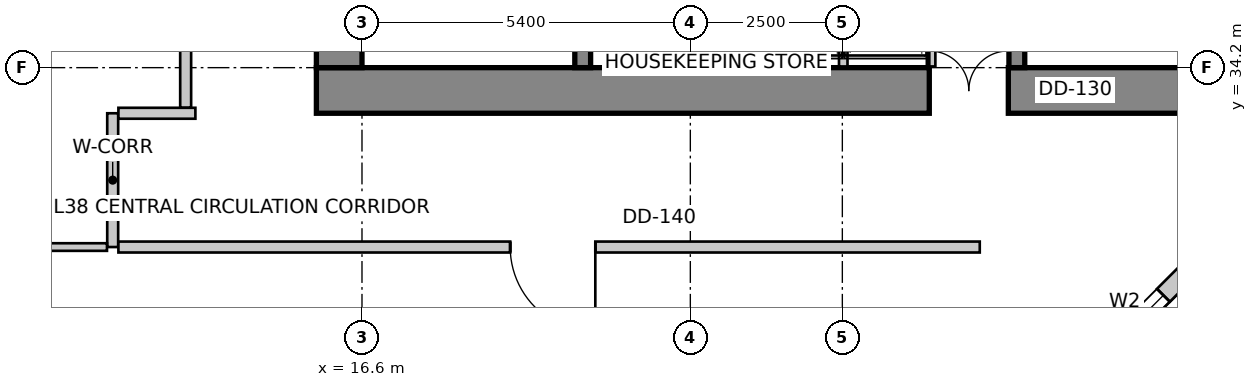
"""IFC4 building model, lengths in metres.
Left out: names, types, materials, properties, quantities, classifications, styles, units other than length and angle.
Written with IfcOpenShell. Run it as: python <this file> out.ifc"""

import sys

from ifc_helpers import new_model, si_unit, direction, frame, frame_2d, origin, place, context, subcontext, project, spatial, rectangle, extrude, source, transform, mapped, element, fill, save


model = new_model("IFC4")
c1 = context("Model", 3, precision=1e-05, world=origin(), true_north=direction((0.0, 1.0)))
c2 = subcontext(c1, "Body", "Model", "MODEL_VIEW")
j1 = project(units=[si_unit("LENGTHUNIT", "METRE"), si_unit("PLANEANGLEUNIT", "RADIAN")], contexts=[c1])
p1 = place(None, origin())
s1 = spatial("IfcSite", under=j1, at=p1, CompositionType="ELEMENT")
p2 = place(p1, origin())
s2 = spatial("IfcBuilding", under=s1, at=p2, CompositionType="ELEMENT")
p3 = place(p2, frame((0.0, 0.0, 153.8)))
s3 = spatial("IfcBuildingStorey", under=s2, at=p3, CompositionType="ELEMENT", Elevation=153.8)
p4 = place(p3, frame((15.85, 33.825, 0.0), z_axis=(0.0, 0.0, 1.0), x_axis=(1.0, 0.0, 0.0)))
e1 = element("IfcWall", 1, at=p4, inside=s3, PredefinedType="SHEAR", context=c2, shape_type="SweptSolid", body=[
    extrude(rectangle(XDim=15.9, YDim=0.75, at=frame_2d((7.95, 0.0))), origin(), (0.0, 0.0, 1.0), 3.6),
])
m1 = source(origin(), c2, "Body", "SweptSolid", [
    extrude(rectangle(XDim=1.3, YDim=2.15, at=frame_2d((0.65, 1.075))), frame((0.0, 0.385, 0.0), z_axis=(0.0, -1.0, 0.0), x_axis=(1.0, 0.0, 0.0)), (0.0, 0.0, 1.0), 0.77),
])
p5 = place(p4, frame((10.08, 0.0, 0.0)))
e2 = element("IfcOpeningElement", 2, at=p5, cuts=e1, PredefinedType="OPENING", context=c2, shape_type="MappedRepresentation", body=[
    mapped(m1, transform((0.0, 0.0, 0.0), scale=1.0)),
])
p6 = place(p3, frame((16.225, 34.2, 0.0), z_axis=(0.0, 0.0, 1.0), x_axis=(0.0, 1.0, 0.0)))
e3 = element("IfcWall", 3, at=p6, inside=s3, PredefinedType="SHEAR", context=c2, shape_type="SweptSolid", body=[
    extrude(rectangle(XDim=11.4, YDim=0.75, at=frame_2d((5.7, 0.0))), origin(), (0.0, 0.0, 1.0), 3.6),
])
m2 = source(origin(), c2, "Body", "SweptSolid", [
    extrude(rectangle(XDim=1.1, YDim=2.15, at=frame_2d((0.55, 1.075))), frame((0.0, 0.385, 0.0), z_axis=(0.0, -1.0, 0.0), x_axis=(1.0, 0.0, 0.0)), (0.0, 0.0, 1.0), 0.77),
])
p7 = place(p6, frame((7.15, 0.0, 0.0)))
e4 = element("IfcOpeningElement", 4, at=p7, cuts=e3, PredefinedType="OPENING", context=c2, shape_type="MappedRepresentation", body=[
    mapped(m2, transform((0.0, 0.0, 0.0), scale=1.0)),
])
p8 = place(p3, frame((20.23, 34.2, 0.0), z_axis=(0.0, 0.0, 1.0), x_axis=(0.0, 1.0, 0.0)))
e5 = element("IfcWall", 5, at=p8, inside=s3, PredefinedType="SHEAR", context=c2, shape_type="SweptSolid", body=[
    extrude(rectangle(XDim=9.06, YDim=0.26, at=frame_2d((4.53, 0.0))), origin(), (0.0, 0.0, 1.0), 3.6),
])
m3 = source(origin(), c2, "Body", "SweptSolid", [
    extrude(rectangle(XDim=1.1, YDim=2.15, at=frame_2d((0.55, 1.075))), frame((0.0, 0.14, 0.0), z_axis=(0.0, -1.0, 0.0), x_axis=(1.0, 0.0, 0.0)), (0.0, 0.0, 1.0), 0.28),
])
p9 = place(p8, frame((7.45, 0.0, 0.0)))
e6 = element("IfcOpeningElement", 6, at=p9, cuts=e5, PredefinedType="OPENING", context=c2, shape_type="MappedRepresentation", body=[
    mapped(m3, transform((0.0, 0.0, 0.0), scale=1.0)),
])
p10 = place(p3, frame((27.37, 34.2, 0.0), z_axis=(0.0, 0.0, 1.0), x_axis=(0.0, 1.0, 0.0)))
e7 = element("IfcWall", 7, at=p10, inside=s3, PredefinedType="SHEAR", context=c2, shape_type="SweptSolid", body=[
    extrude(rectangle(XDim=9.06, YDim=0.26, at=frame_2d((4.53, 0.0))), origin(), (0.0, 0.0, 1.0), 3.6),
])
p11 = place(p10, frame((7.45, 0.0, 0.0)))
e8 = element("IfcOpeningElement", 8, at=p11, cuts=e7, PredefinedType="OPENING", context=c2, shape_type="MappedRepresentation", body=[
    mapped(m3, transform((0.0, 0.0, 0.0), scale=1.0)),
])
p12 = place(p3, frame((28.116, 28.792, 0.0), z_axis=(0.0, 0.0, 1.0), x_axis=(0.707064797706, 0.707148762175, 0.0)))
e9 = element("IfcWall", 9, at=p12, inside=s3, PredefinedType="SOLIDWALL", context=c2, shape_type="SweptSolid", body=[
    extrude(rectangle(XDim=2.908, YDim=0.3, at=frame_2d((1.454, 0.0))), origin(), (0.0, 0.0, 1.0), 3.35),
])
m4 = source(origin(), c2, "Body", "SweptSolid", [
    extrude(rectangle(XDim=1.8, YDim=2.1, at=frame_2d((0.9, 1.05))), frame((0.0, 0.16, 0.0), z_axis=(0.0, -1.0, 0.0), x_axis=(1.0, 0.0, 0.0)), (0.0, 0.0, 1.0), 0.32),
])
p13 = place(p12, frame((0.554, 0.0, 0.85)))
e10 = element("IfcOpeningElement", 10, at=p13, cuts=e9, PredefinedType="OPENING", context=c2, shape_type="MappedRepresentation", body=[
    mapped(m4, transform((0.0, 0.0, 0.0), scale=1.0)),
])
p14 = place(p3, frame((13.269, 47.134, 0.0), z_axis=(0.0, 0.0, 1.0), x_axis=(-0.319929773322, -0.947441259468, 0.0)))
e11 = element("IfcWall", 11, at=p14, inside=s3, PredefinedType="SOLIDWALL", context=c2, shape_type="SweptSolid", body=[
    extrude(rectangle(XDim=16.134, YDim=0.3, at=frame_2d((8.067, 0.0))), origin(), (0.0, 0.0, 1.0), 3.35),
])
m5 = source(origin(), c2, "Body", "SweptSolid", [
    extrude(rectangle(XDim=2.4, YDim=2.2, at=frame_2d((1.2, 1.1))), frame((0.0, 0.16, 0.0), z_axis=(0.0, -1.0, 0.0), x_axis=(1.0, 0.0, 0.0)), (0.0, 0.0, 1.0), 0.32),
])
p15 = place(p14, frame((2.276, 0.0, 0.85)))
e12 = element("IfcOpeningElement", 12, at=p15, cuts=e11, PredefinedType="OPENING", context=c2, shape_type="MappedRepresentation", body=[
    mapped(m5, transform((0.0, 0.0, 0.0), scale=1.0)),
])
m6 = source(origin(), c2, "Body", "SweptSolid", [
    extrude(rectangle(XDim=2.1, YDim=2.0, at=frame_2d((1.05, 1.0))), frame((0.0, 0.16, 0.0), z_axis=(0.0, -1.0, 0.0), x_axis=(1.0, 0.0, 0.0)), (0.0, 0.0, 1.0), 0.32),
])
p16 = place(p14, frame((7.361, 0.0, 0.85)))
e13 = element("IfcOpeningElement", 13, at=p16, cuts=e11, PredefinedType="OPENING", context=c2, shape_type="MappedRepresentation", body=[
    mapped(m6, transform((0.0, 0.0, 0.0), scale=1.0)),
])
p17 = place(p14, frame((12.146, 0.0, 0.85)))
e14 = element("IfcOpeningElement", 14, at=p17, cuts=e11, PredefinedType="OPENING", context=c2, shape_type="MappedRepresentation", body=[
    mapped(m5, transform((0.0, 0.0, 0.0), scale=1.0)),
])
p18 = place(p3, frame((8.187, 31.834, 0.0), z_axis=(0.0, 0.0, 1.0), x_axis=(0.198869838988, -0.980025911464, 0.0)))
e15 = element("IfcWall", 15, at=p18, inside=s3, PredefinedType="SOLIDWALL", context=c2, shape_type="SweptSolid", body=[
    extrude(rectangle(XDim=16.363, YDim=0.3, at=frame_2d((8.182, 0.0))), origin(), (0.0, 0.0, 1.0), 3.35),
])
p19 = place(p18, frame((2.676, 0.0, 0.85)))
e16 = element("IfcOpeningElement", 16, at=p19, cuts=e15, PredefinedType="OPENING", context=c2, shape_type="MappedRepresentation", body=[
    mapped(m6, transform((0.0, 0.0, 0.0), scale=1.0)),
])
p20 = place(p18, frame((8.301, 0.0, 0.85)))
e17 = element("IfcOpeningElement", 17, at=p20, cuts=e15, PredefinedType="OPENING", context=c2, shape_type="MappedRepresentation", body=[
    mapped(m5, transform((0.0, 0.0, 0.0), scale=1.0)),
])
p21 = place(p18, frame((13.386, 0.0, 0.85)))
e18 = element("IfcOpeningElement", 18, at=p21, cuts=e15, PredefinedType="OPENING", context=c2, shape_type="MappedRepresentation", body=[
    mapped(m6, transform((0.0, 0.0, 0.0), scale=1.0)),
])
for number, where, z_axis, x_axis in (
    (19, (25.96, 34.22, 0.0), (0.0, 0.0, 1.0), (0.0, 1.0, 0.0)),
    (20, (23.07, 34.22, 0.0), (0.0, 0.0, 1.0), (0.0, 1.0, 0.0)),
    (21, (24.515, 34.22, 0.0), (0.0, 0.0, 1.0), (0.0, 1.0, 0.0)),
):
    element("IfcWall", number, at=place(p3, frame(where, z_axis=z_axis, x_axis=x_axis)), inside=s3, PredefinedType="SOLIDWALL", context=c2, shape_type="SweptSolid", body=[
        extrude(rectangle(XDim=1.62, YDim=0.14, at=frame_2d((0.81, 0.0))), origin(), (0.0, 0.0, 1.0), 2.642),
    ])
p22 = place(p3, frame((12.5, 31.25, 0.0), z_axis=(0.0, 0.0, 1.0), x_axis=(0.0, 1.0, 0.0)))
e22 = element("IfcWall", 22, at=p22, inside=s3, PredefinedType="PARTITIONING", context=c2, shape_type="SweptSolid", body=[
    extrude(rectangle(XDim=2.2, YDim=0.18, at=frame_2d((1.1, 0.0))), origin(), (0.0, 0.0, 1.0), 3.034),
])
p23 = place(p3, frame((12.594, 33.45, 0.0), z_axis=(0.0, 0.0, 1.0), x_axis=(1.0, 0.0, 0.0)))
e23 = element("IfcWall", 23, at=p23, inside=s3, PredefinedType="PARTITIONING", context=c2, shape_type="SweptSolid", body=[
    extrude(rectangle(XDim=1.266, YDim=0.18, at=frame_2d((0.633, 0.0))), origin(), (0.0, 0.0, 1.0), 3.35),
])
p24 = place(p3, frame((26.76, 31.25, 0.0), z_axis=(0.0, 0.0, 1.0), x_axis=(-1.0, 0.0, 0.0)))
e24 = element("IfcWall", 24, at=p24, inside=s3, PredefinedType="PARTITIONING", context=c2, shape_type="SweptSolid", body=[
    extrude(rectangle(XDim=14.166, YDim=0.18, at=frame_2d((7.083, 0.0))), origin(), (0.0, 0.0, 1.0), 3.034),
])
m7 = source(origin(), c2, "Body", "SweptSolid", [
    extrude(rectangle(XDim=1.4, YDim=2.15, at=frame_2d((0.7, 1.075))), frame((0.0, 0.1, 0.0), z_axis=(0.0, -1.0, 0.0), x_axis=(1.0, 0.0, 0.0)), (0.0, 0.0, 1.0), 0.2),
])
p25 = place(p24, frame((6.323, 0.0, 0.0)))
e25 = element("IfcOpeningElement", 25, at=p25, cuts=e24, PredefinedType="OPENING", context=c2, shape_type="MappedRepresentation", body=[
    mapped(m7, transform((0.0, 0.0, 0.0), scale=1.0)),
])
p26 = place(p3, frame((13.7, 33.544, 0.0), z_axis=(0.0, 0.0, 1.0), x_axis=(0.0, 1.0, 0.0)))
e26 = element("IfcWall", 26, at=p26, inside=s3, PredefinedType="PARTITIONING", context=c2, shape_type="SweptSolid", body=[
    extrude(rectangle(XDim=13.86, YDim=0.18, at=frame_2d((6.93, 0.0))), origin(), (0.0, 0.0, 1.0), 2.492),
])
m8 = source(origin(), c2, "Body", "SweptSolid", [
    extrude(rectangle(XDim=0.9, YDim=2.15, at=frame_2d((0.45, 1.075))), frame((0.0, 0.1, 0.0), z_axis=(0.0, -1.0, 0.0), x_axis=(1.0, 0.0, 0.0)), (0.0, 0.0, 1.0), 0.2),
])
p27 = place(p26, frame((4.253, 0.0, 0.0)))
e27 = element("IfcOpeningElement", 27, at=p27, cuts=e26, PredefinedType="OPENING", context=c2, shape_type="MappedRepresentation", body=[
    mapped(m8, transform((0.0, 0.0, 0.0), scale=1.0)),
])
p28 = place(p3, frame((12.406, 31.25, 0.0), z_axis=(0.0, 0.0, 1.0), x_axis=(-1.0, 0.0, 0.0)))
e28 = element("IfcWall", 28, at=p28, inside=s3, PredefinedType="PARTITIONING", context=c2, shape_type="SweptSolid", body=[
    extrude(rectangle(XDim=3.983, YDim=0.125, at=frame_2d((1.992, 0.0))), origin(), (0.0, 0.0, 1.0), 2.492),
])
m9 = source(origin(), c2, "Body", "SweptSolid", [
    extrude(rectangle(XDim=1.8, YDim=2.1, at=frame_2d((0.9, 1.05))), frame((0.0, -0.015, 0.0), z_axis=(0.0, -1.0, 0.0), x_axis=(1.0, 0.0, 0.0)), (0.0, 0.0, 1.0), 0.06),
])
p29 = place(p13, origin())
e29 = element("IfcWindow", 29, at=p29, inside=s3, PartitioningType="SINGLE_PANEL", PredefinedType="WINDOW", context=c2, shape_type="MappedRepresentation", body=[
    mapped(m9, transform((0.0, 0.0, 0.0), scale=1.0)),
])
fill(e10, e29)
m10 = source(origin(), c2, "Body", "SweptSolid", [
    extrude(rectangle(XDim=1.3, YDim=2.15, at=frame_2d((0.65, 1.075))), frame((0.0, 0.025, 0.0), z_axis=(0.0, -1.0, 0.0), x_axis=(1.0, 0.0, 0.0)), (0.0, 0.0, 1.0), 0.05),
])
p30 = place(p5, origin())
e30 = element("IfcDoor", 30, at=p30, inside=s3, OperationType="DOUBLE_DOOR_SINGLE_SWING", PredefinedType="DOOR", context=c2, shape_type="MappedRepresentation", body=[
    mapped(m10, transform((0.0, 0.0, 0.0), scale=1.0)),
])
fill(e2, e30)
m11 = source(origin(), c2, "Body", "SweptSolid", [
    extrude(rectangle(XDim=1.4, YDim=2.15, at=frame_2d((0.7, 1.075))), frame((0.0, 0.025, 0.0), z_axis=(0.0, -1.0, 0.0), x_axis=(1.0, 0.0, 0.0)), (0.0, 0.0, 1.0), 0.05),
])
p31 = place(p25, origin())
e31 = element("IfcDoor", 31, at=p31, inside=s3, OperationType="SINGLE_SWING_LEFT", PredefinedType="DOOR", context=c2, shape_type="MappedRepresentation", body=[
    mapped(m11, transform((0.0, 0.0, 0.0), scale=1.0)),
])
fill(e25, e31)
save(model, sys.argv[1])
